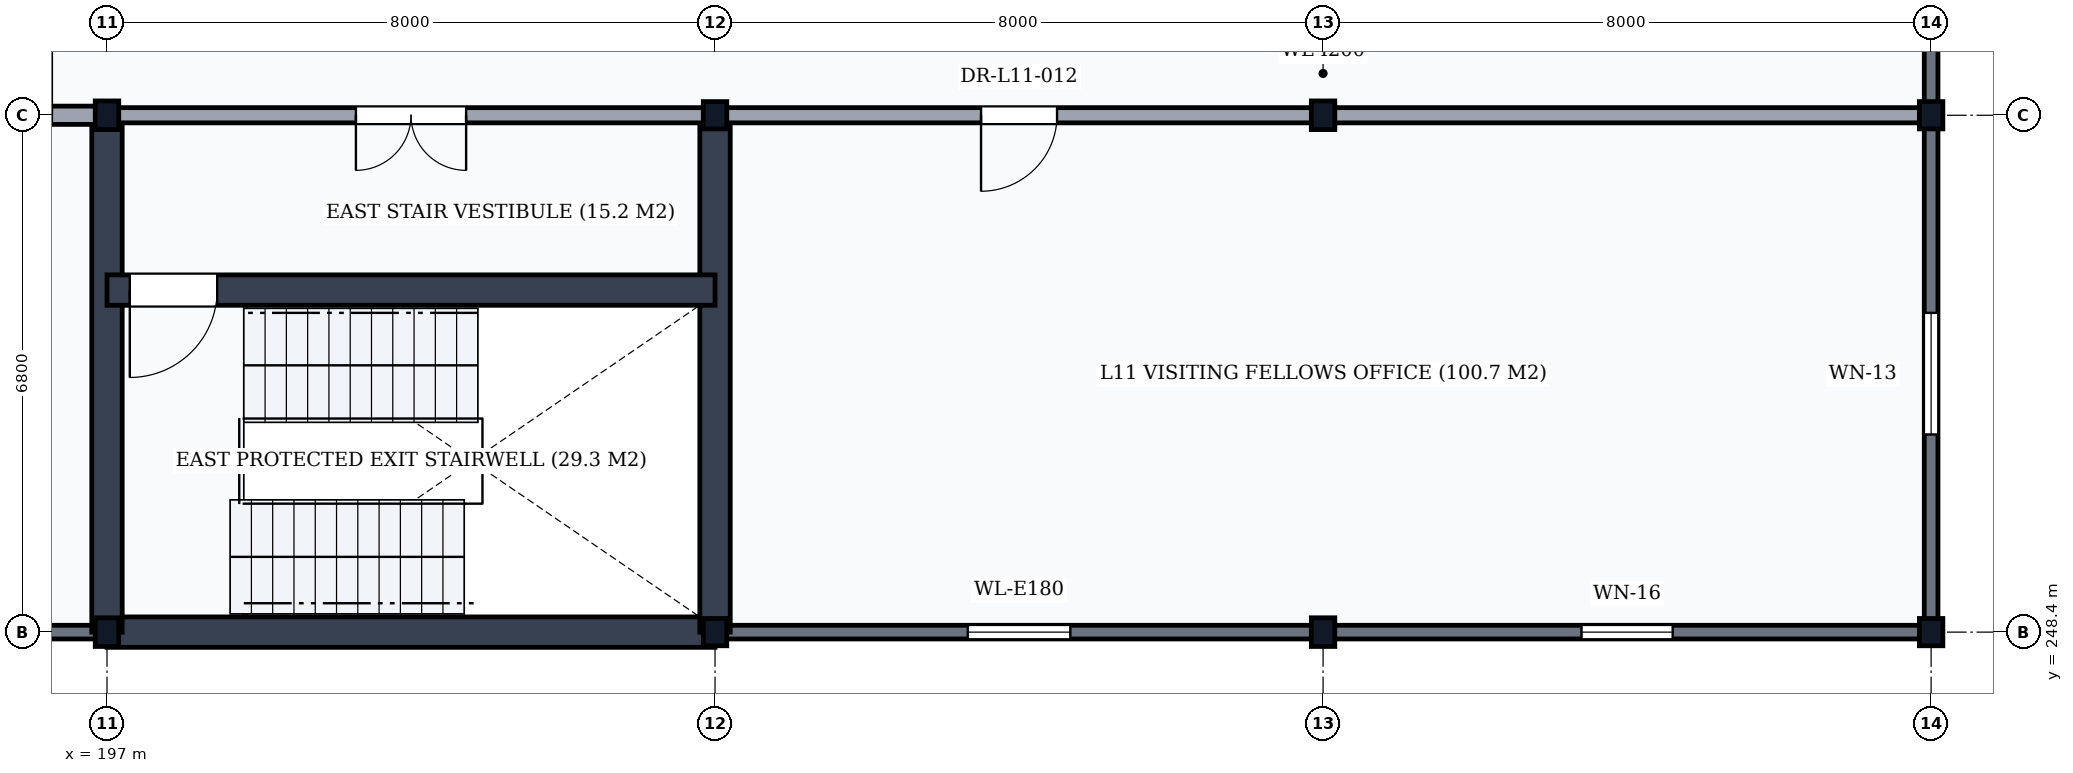
"""IFC4 building model, lengths in metres.
Left out: names, types, materials, properties, quantities, classifications, styles, units other than length and angle.
Written with IfcOpenShell. Run it as: python <this file> out.ifc"""

import sys

from ifc_helpers import new_model, si_unit, direction, frame, frame_2d, origin, origin_2d, place, context, subcontext, project, spatial, rectangle, i_section, extrude, element, fill, save


model = new_model("IFC4")
c1 = context("Model", 3, precision=1e-05, world=origin(), true_north=direction((0.0, 1.0)))
c2 = subcontext(c1, "Body", "Model", "MODEL_VIEW")
j1 = project(units=[si_unit("LENGTHUNIT", "METRE"), si_unit("PLANEANGLEUNIT", "RADIAN")], contexts=[c1])
p1 = place(None, origin())
s1 = spatial("IfcSite", under=j1, at=p1, CompositionType="ELEMENT")
p2 = place(p1, origin())
s2 = spatial("IfcBuilding", under=s1, at=p2, CompositionType="ELEMENT")
p3 = place(p2, frame((0.0, 0.0, 43.8)))
s3 = spatial("IfcBuildingStorey", under=s2, at=p3, CompositionType="ELEMENT", Elevation=43.8)
for number, where, z_axis, x_axis in (
    (1, (197.0, 248.4, 0.0), (0.0, 0.0, 1.0), (1.0, 0.0, 0.0)),
    (2, (197.0, 255.2, 0.0), (0.0, 0.0, 1.0), (1.0, 0.0, 0.0)),
):
    element("IfcColumn", number, at=place(p3, frame(where, z_axis=z_axis, x_axis=x_axis)), inside=s3, PredefinedType="COLUMN", context=c2, shape_type="SweptSolid", body=[
        extrude(i_section(OverallWidth=0.309, OverallDepth=0.377, WebThickness=0.021, FlangeThickness=0.04, FilletRadius=0.027, at=origin_2d()), origin(), (0.0, 0.0, 1.0), 3.9),
    ])
for number, where, z_axis, x_axis in (
    (3, (205.0, 248.4, 0.0), (0.0, 0.0, 1.0), (1.0, 0.0, 0.0)),
    (4, (205.0, 255.2, 0.0), (0.0, 0.0, 1.0), (1.0, 0.0, 0.0)),
):
    element("IfcColumn", number, at=place(p3, frame(where, z_axis=z_axis, x_axis=x_axis)), inside=s3, PredefinedType="COLUMN", context=c2, shape_type="SweptSolid", body=[
        extrude(i_section(OverallWidth=0.309, OverallDepth=0.359, WebThickness=0.021, FlangeThickness=0.04, FilletRadius=0.027, at=origin_2d()), origin(), (0.0, 0.0, 1.0), 3.9),
    ])
for number, where, z_axis, x_axis in (
    (5, (213.0, 248.4, 0.0), (0.0, 0.0, 1.0), (1.0, 0.0, 0.0)),
    (6, (213.0, 255.2, 0.0), (0.0, 0.0, 1.0), (1.0, 0.0, 0.0)),
):
    element("IfcColumn", number, at=place(p3, frame(where, z_axis=z_axis, x_axis=x_axis)), inside=s3, PredefinedType="COLUMN", context=c2, shape_type="SweptSolid", body=[
        extrude(i_section(OverallWidth=0.309, OverallDepth=0.377, WebThickness=0.021, FlangeThickness=0.04, FilletRadius=0.027, at=origin_2d()), origin(), (0.0, 0.0, 1.0), 3.9),
    ])
for number, where, z_axis, x_axis in (
    (7, (221.0, 248.4, 0.0), (0.0, 0.0, 1.0), (1.0, 0.0, 0.0)),
    (8, (221.0, 255.2, 0.0), (0.0, 0.0, 1.0), (1.0, 0.0, 0.0)),
):
    element("IfcColumn", number, at=place(p3, frame(where, z_axis=z_axis, x_axis=x_axis)), inside=s3, PredefinedType="COLUMN", context=c2, shape_type="SweptSolid", body=[
        extrude(i_section(OverallWidth=0.309, OverallDepth=0.359, WebThickness=0.021, FlangeThickness=0.04, FilletRadius=0.027, at=origin_2d()), origin(), (0.0, 0.0, 1.0), 3.9),
    ])
p4 = place(p3, frame((189.006, 248.4, 0.0), z_axis=(0.0, 0.0, 1.0), x_axis=(1.0, 0.0, 0.0)))
e9 = element("IfcWall", 9, at=p4, inside=s3, PredefinedType="SOLIDWALL", context=c2, shape_type="SweptSolid", body=[
    extrude(rectangle(XDim=7.988, YDim=0.18, at=frame_2d((3.994, 0.0))), origin(), (0.0, 0.0, 1.0), 3.368),
])
p5 = place(p3, frame((205.006, 248.4, 0.0), z_axis=(0.0, 0.0, 1.0), x_axis=(1.0, 0.0, 0.0)))
e10 = element("IfcWall", 10, at=p5, inside=s3, PredefinedType="SOLIDWALL", context=c2, shape_type="SweptSolid", body=[
    extrude(rectangle(XDim=7.988, YDim=0.18, at=frame_2d((3.994, 0.0))), origin(), (0.0, 0.0, 1.0), 3.368),
])
p6 = place(p5, frame((3.319, 0.0, 0.95)))
e11 = element("IfcOpeningElement", 11, at=p6, cuts=e10, PredefinedType="OPENING", context=c2, shape_type="SweptSolid", body=[
    extrude(rectangle(XDim=1.35, YDim=1.8, at=frame_2d((0.675, 0.9))), frame((0.0, 0.105, 0.0), z_axis=(0.0, -1.0, 0.0), x_axis=(1.0, 0.0, 0.0)), (0.0, 0.0, 1.0), 0.21),
])
p7 = place(p3, frame((213.006, 248.4, 0.0), z_axis=(0.0, 0.0, 1.0), x_axis=(1.0, 0.0, 0.0)))
e12 = element("IfcWall", 12, at=p7, inside=s3, PredefinedType="SOLIDWALL", context=c2, shape_type="SweptSolid", body=[
    extrude(rectangle(XDim=7.988, YDim=0.18, at=frame_2d((3.994, 0.0))), origin(), (0.0, 0.0, 1.0), 3.368),
])
p8 = place(p7, frame((3.394, 0.0, 0.95)))
e13 = element("IfcOpeningElement", 13, at=p8, cuts=e12, PredefinedType="OPENING", context=c2, shape_type="SweptSolid", body=[
    extrude(rectangle(XDim=1.2, YDim=1.8, at=frame_2d((0.6, 0.9))), frame((0.0, 0.105, 0.0), z_axis=(0.0, -1.0, 0.0), x_axis=(1.0, 0.0, 0.0)), (0.0, 0.0, 1.0), 0.21),
])
p9 = place(p3, frame((221.0, 248.406, 0.0), z_axis=(0.0, 0.0, 1.0), x_axis=(0.0, 1.0, 0.0)))
e14 = element("IfcWall", 14, at=p9, inside=s3, PredefinedType="SOLIDWALL", context=c2, shape_type="SweptSolid", body=[
    extrude(rectangle(XDim=6.788, YDim=0.18, at=frame_2d((3.394, 0.0))), origin(), (0.0, 0.0, 1.0), 3.448),
])
p10 = place(p9, frame((2.594, 0.0, 0.95)))
e15 = element("IfcOpeningElement", 15, at=p10, cuts=e14, PredefinedType="OPENING", context=c2, shape_type="SweptSolid", body=[
    extrude(rectangle(XDim=1.6, YDim=2.0, at=frame_2d((0.8, 1.0))), frame((0.0, 0.105, 0.0), z_axis=(0.0, -1.0, 0.0), x_axis=(1.0, 0.0, 0.0)), (0.0, 0.0, 1.0), 0.21),
])
p11 = place(p3, frame((221.0, 255.206, 0.0), z_axis=(0.0, 0.0, 1.0), x_axis=(0.0, 1.0, 0.0)))
e16 = element("IfcWall", 16, at=p11, inside=s3, PredefinedType="SOLIDWALL", context=c2, shape_type="SweptSolid", body=[
    extrude(rectangle(XDim=7.588, YDim=0.18, at=frame_2d((3.794, 0.0))), origin(), (0.0, 0.0, 1.0), 3.408),
])
p12 = place(p11, frame((4.316, 0.0, 0.95)))
e17 = element("IfcOpeningElement", 17, at=p12, cuts=e16, PredefinedType="OPENING", context=c2, shape_type="SweptSolid", body=[
    extrude(rectangle(XDim=1.5, YDim=1.9, at=frame_2d((0.75, 0.95))), frame((0.0, 0.105, 0.0), z_axis=(0.0, -1.0, 0.0), x_axis=(1.0, 0.0, 0.0)), (0.0, 0.0, 1.0), 0.21),
])
p13 = place(p3, frame((197.0, 248.4, 0.0), z_axis=(0.0, 0.0, 1.0), x_axis=(1.0, 0.0, 0.0)))
e18 = element("IfcWall", 18, at=p13, inside=s3, PredefinedType="SHEAR", context=c2, shape_type="SweptSolid", body=[
    extrude(rectangle(XDim=8.0, YDim=0.4, at=frame_2d((4.0, 0.0))), origin(), (0.0, 0.0, 1.0), 3.68),
])
for number, where, z_axis, x_axis in (
    (19, (197.0, 248.4, 0.0), (0.0, 0.0, 1.0), (0.0, 1.0, 0.0)),
    (20, (205.0, 248.4, 0.0), (0.0, 0.0, 1.0), (0.0, 1.0, 0.0)),
):
    element("IfcWall", number, at=place(p3, frame(where, z_axis=z_axis, x_axis=x_axis)), inside=s3, PredefinedType="SHEAR", context=c2, shape_type="SweptSolid", body=[
        extrude(rectangle(XDim=6.8, YDim=0.4, at=frame_2d((3.4, 0.0))), origin(), (0.0, 0.0, 1.0), 3.68),
    ])
p14 = place(p3, frame((197.0, 252.9, 0.0), z_axis=(0.0, 0.0, 1.0), x_axis=(1.0, 0.0, 0.0)))
e21 = element("IfcWall", 21, at=p14, inside=s3, PredefinedType="SHEAR", context=c2, shape_type="SweptSolid", body=[
    extrude(rectangle(XDim=8.0, YDim=0.4, at=frame_2d((4.0, 0.0))), origin(), (0.0, 0.0, 1.0), 3.68),
])
p15 = place(p14, frame((0.3, 0.0, 0.0)))
e22 = element("IfcOpeningElement", 22, at=p15, cuts=e21, PredefinedType="OPENING", context=c2, shape_type="SweptSolid", body=[
    extrude(rectangle(XDim=1.15, YDim=2.15, at=frame_2d((0.575, 1.075))), frame((0.0, 0.215, 0.0), z_axis=(0.0, -1.0, 0.0), x_axis=(1.0, 0.0, 0.0)), (0.0, 0.0, 1.0), 0.43),
])
p16 = place(p3, frame((197.0, 255.2, 0.0), z_axis=(0.0, 0.0, 1.0), x_axis=(1.0, 0.0, 0.0)))
e23 = element("IfcWall", 23, at=p16, inside=s3, PredefinedType="PARTITIONING", context=c2, shape_type="SweptSolid", body=[
    extrude(rectangle(XDim=8.0, YDim=0.2, at=frame_2d((4.0, 0.0))), origin(), (0.0, 0.0, 1.0), 3.178),
])
p17 = place(p16, frame((3.275, 0.0, 0.0)))
e24 = element("IfcOpeningElement", 24, at=p17, cuts=e23, PredefinedType="OPENING", context=c2, shape_type="SweptSolid", body=[
    extrude(rectangle(XDim=1.45, YDim=2.2, at=frame_2d((0.725, 1.1))), frame((0.0, 0.115, 0.0), z_axis=(0.0, -1.0, 0.0), x_axis=(1.0, 0.0, 0.0)), (0.0, 0.0, 1.0), 0.23),
])
p18 = place(p3, frame((189.0, 255.2, 0.0), z_axis=(0.0, 0.0, 1.0), x_axis=(1.0, 0.0, 0.0)))
e25 = element("IfcWall", 25, at=p18, inside=s3, PredefinedType="PARTITIONING", context=c2, shape_type="SweptSolid", body=[
    extrude(rectangle(XDim=8.0, YDim=0.24, at=frame_2d((4.0, 0.0))), origin(), (0.0, 0.0, 1.0), 3.178),
])
p19 = place(p18, frame((1.05, 0.0, 0.0)))
e26 = element("IfcOpeningElement", 26, at=p19, cuts=e25, PredefinedType="OPENING", context=c2, shape_type="SweptSolid", body=[
    extrude(rectangle(XDim=1.0, YDim=2.1, at=frame_2d((0.5, 1.05))), frame((0.0, 0.135, 0.0), z_axis=(0.0, -1.0, 0.0), x_axis=(1.0, 0.0, 0.0)), (0.0, 0.0, 1.0), 0.27),
])
p20 = place(p18, frame((3.6, 0.0, 0.0)))
e27 = element("IfcOpeningElement", 27, at=p20, cuts=e25, PredefinedType="OPENING", context=c2, shape_type="SweptSolid", body=[
    extrude(rectangle(XDim=1.5, YDim=2.25, at=frame_2d((0.75, 1.125))), frame((0.0, 0.135, 0.0), z_axis=(0.0, -1.0, 0.0), x_axis=(1.0, 0.0, 0.0)), (0.0, 0.0, 1.0), 0.27),
])
p21 = place(p18, frame((6.425, 0.0, 0.0)))
e28 = element("IfcOpeningElement", 28, at=p21, cuts=e25, PredefinedType="OPENING", context=c2, shape_type="SweptSolid", body=[
    extrude(rectangle(XDim=0.85, YDim=2.1, at=frame_2d((0.425, 1.05))), frame((0.0, 0.135, 0.0), z_axis=(0.0, -1.0, 0.0), x_axis=(1.0, 0.0, 0.0)), (0.0, 0.0, 1.0), 0.27),
])
p22 = place(p3, frame((205.0, 255.2, 0.0), z_axis=(0.0, 0.0, 1.0), x_axis=(1.0, 0.0, 0.0)))
e29 = element("IfcWall", 29, at=p22, inside=s3, PredefinedType="PARTITIONING", context=c2, shape_type="SweptSolid", body=[
    extrude(rectangle(XDim=16.0, YDim=0.2, at=frame_2d((8.0, 0.0))), origin(), (0.0, 0.0, 1.0), 3.178),
])
p23 = place(p22, frame((3.5, 0.0, 0.0)))
e30 = element("IfcOpeningElement", 30, at=p23, cuts=e29, PredefinedType="OPENING", context=c2, shape_type="SweptSolid", body=[
    extrude(rectangle(XDim=1.0, YDim=2.1, at=frame_2d((0.5, 1.05))), frame((0.0, 0.115, 0.0), z_axis=(0.0, -1.0, 0.0), x_axis=(1.0, 0.0, 0.0)), (0.0, 0.0, 1.0), 0.23),
])
p24 = place(p6, origin())
e31 = element("IfcWindow", 31, at=p24, inside=s3, PartitioningType="SINGLE_PANEL", PredefinedType="WINDOW", context=c2, shape_type="SweptSolid", body=[
    extrude(rectangle(XDim=1.35, YDim=1.8, at=frame_2d((0.675, 0.9))), frame((0.0, 0.03, 0.0), z_axis=(0.0, -1.0, 0.0), x_axis=(1.0, 0.0, 0.0)), (0.0, 0.0, 1.0), 0.06),
])
fill(e11, e31)
p25 = place(p8, origin())
e32 = element("IfcWindow", 32, at=p25, inside=s3, PartitioningType="SINGLE_PANEL", PredefinedType="WINDOW", context=c2, shape_type="SweptSolid", body=[
    extrude(rectangle(XDim=1.2, YDim=1.8, at=frame_2d((0.6, 0.9))), frame((0.0, 0.03, 0.0), z_axis=(0.0, -1.0, 0.0), x_axis=(1.0, 0.0, 0.0)), (0.0, 0.0, 1.0), 0.06),
])
fill(e13, e32)
p26 = place(p10, origin())
e33 = element("IfcWindow", 33, at=p26, inside=s3, PartitioningType="SINGLE_PANEL", PredefinedType="WINDOW", context=c2, shape_type="SweptSolid", body=[
    extrude(rectangle(XDim=1.6, YDim=2.0, at=frame_2d((0.8, 1.0))), frame((0.0, 0.03, 0.0), z_axis=(0.0, -1.0, 0.0), x_axis=(1.0, 0.0, 0.0)), (0.0, 0.0, 1.0), 0.06),
])
fill(e15, e33)
p27 = place(p15, frame((1.15, 0.0, 0.0), z_axis=(0.0, 0.0, 1.0), x_axis=(-1.0, 0.0, 0.0)))
e34 = element("IfcDoor", 34, at=p27, inside=s3, OperationType="SINGLE_SWING_RIGHT", PredefinedType="DOOR", context=c2, shape_type="SweptSolid", body=[
    extrude(rectangle(XDim=1.15, YDim=2.15, at=frame_2d((0.575, 1.075))), frame((0.0, 0.025, 0.0), z_axis=(0.0, -1.0, 0.0), x_axis=(1.0, 0.0, 0.0)), (0.0, 0.0, 1.0), 0.05),
])
fill(e22, e34)
p28 = place(p17, frame((1.45, 0.0, 0.0), z_axis=(0.0, 0.0, 1.0), x_axis=(-1.0, 0.0, 0.0)))
e35 = element("IfcDoor", 35, at=p28, inside=s3, OperationType="DOUBLE_DOOR_SINGLE_SWING", PredefinedType="DOOR", context=c2, shape_type="SweptSolid", body=[
    extrude(rectangle(XDim=1.45, YDim=2.2, at=frame_2d((0.725, 1.1))), frame((0.0, 0.025, 0.0), z_axis=(0.0, -1.0, 0.0), x_axis=(1.0, 0.0, 0.0)), (0.0, 0.0, 1.0), 0.05),
])
fill(e24, e35)
p29 = place(p23, frame((1.0, 0.0, 0.0), z_axis=(0.0, 0.0, 1.0), x_axis=(-1.0, 0.0, 0.0)))
e36 = element("IfcDoor", 36, at=p29, inside=s3, OperationType="SINGLE_SWING_RIGHT", PredefinedType="DOOR", context=c2, shape_type="SweptSolid", body=[
    extrude(rectangle(XDim=1.0, YDim=2.1, at=frame_2d((0.5, 1.05))), frame((0.0, 0.025, 0.0), z_axis=(0.0, -1.0, 0.0), x_axis=(1.0, 0.0, 0.0)), (0.0, 0.0, 1.0), 0.05),
])
fill(e30, e36)
save(model, sys.argv[1])
